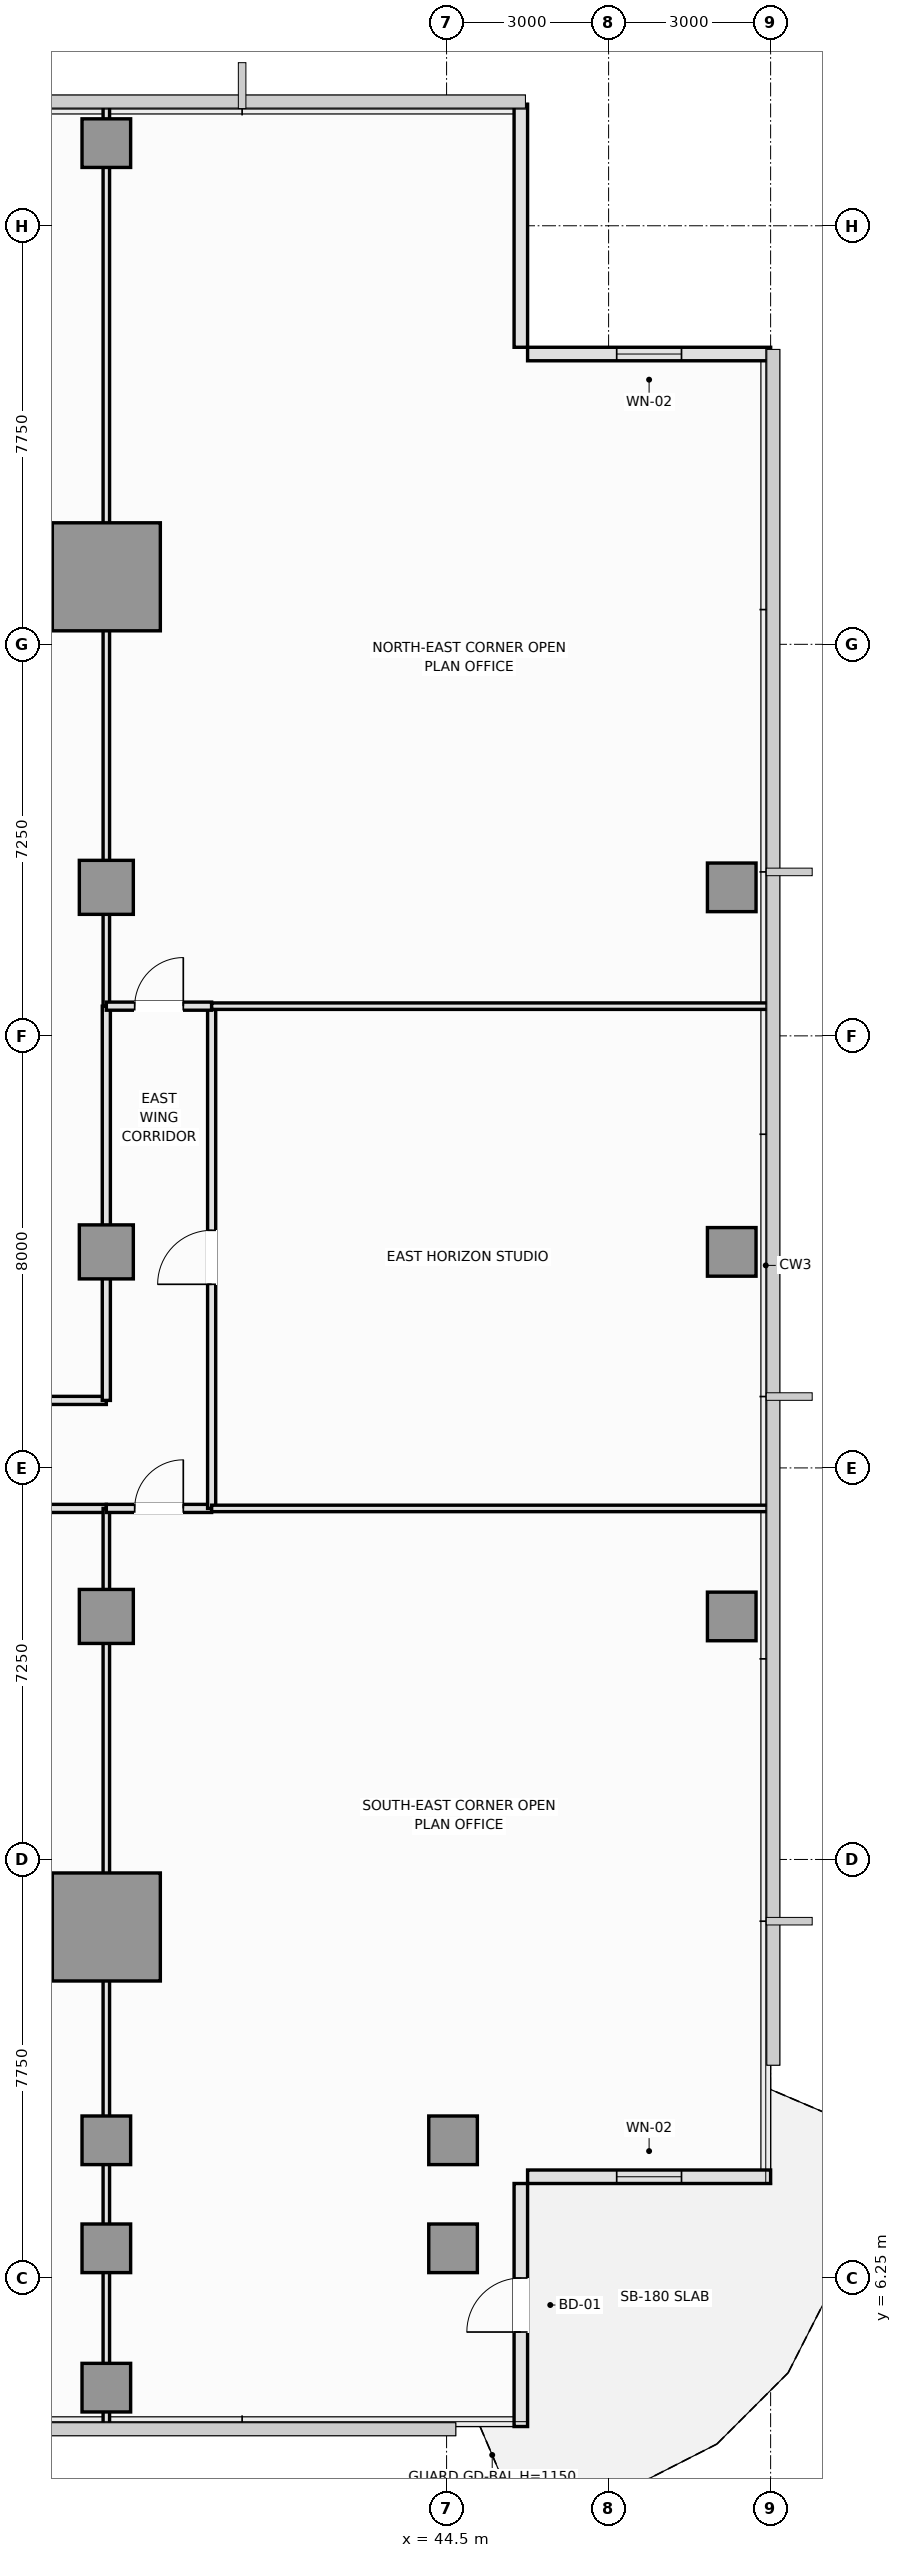
"""IFC4 building model, lengths in metres.
Left out: names, types, materials, properties, quantities, classifications, styles, units other than length and angle.
Written with IfcOpenShell. Run it as: python <this file> out.ifc"""

import sys

from ifc_helpers import new_model, si_unit, direction, frame, frame_2d, origin, origin_2d, place, context, subcontext, project, spatial, rectangle, extrude, element, fill, save


model = new_model("IFC4")
c1 = context("Model", 3, precision=1e-05, world=origin(), true_north=direction((0.0, 1.0)))
c2 = subcontext(c1, "Body", "Model", "MODEL_VIEW")
j1 = project(units=[si_unit("LENGTHUNIT", "METRE"), si_unit("PLANEANGLEUNIT", "RADIAN")], contexts=[c1])
p1 = place(None, origin())
s1 = spatial("IfcSite", under=j1, at=p1, CompositionType="ELEMENT")
p2 = place(p1, origin())
s2 = spatial("IfcBuilding", under=s1, at=p2, CompositionType="ELEMENT")
p3 = place(p2, frame((0.0, 0.0, 105.8)))
s3 = spatial("IfcBuildingStorey", under=s2, at=p3, CompositionType="ELEMENT", Elevation=105.8)
for number, where, z_axis, x_axis in (
    (1, (38.2, 12.75, 0.0), (0.0, 0.0, 1.0), (1.0, 0.0, 0.0)),
    (2, (38.2, 37.75, 0.0), (0.0, 0.0, 1.0), (1.0, 0.0, 0.0)),
):
    element("IfcColumn", number, at=place(p3, frame(where, z_axis=z_axis, x_axis=x_axis)), inside=s3, PredefinedType="COLUMN", context=c2, shape_type="SweptSolid", body=[
        extrude(rectangle(XDim=2.0, YDim=2.0, at=origin_2d()), origin(), (0.0, 0.0, 1.0), 3.55),
    ])
for number, where, z_axis, x_axis in (
    (3, (38.2, 18.5, 0.0), (0.0, 0.0, 1.0), (1.0, 0.0, 0.0)),
    (4, (38.2, 25.25, 0.0), (0.0, 0.0, 1.0), (1.0, 0.0, 0.0)),
    (5, (38.2, 32.0, 0.0), (0.0, 0.0, 1.0), (1.0, 0.0, 0.0)),
):
    element("IfcColumn", number, at=place(p3, frame(where, z_axis=z_axis, x_axis=x_axis)), inside=s3, PredefinedType="COLUMN", context=c2, shape_type="SweptSolid", body=[
        extrude(rectangle(XDim=1.0, YDim=1.0, at=origin_2d()), origin(), (0.0, 0.0, 1.0), 3.55),
    ])
for number, where, z_axis, x_axis in (
    (6, (38.2, 6.8, 0.0), (0.0, 0.0, 1.0), (1.0, 0.0, 0.0)),
    (7, (38.2, 8.8, 0.0), (0.0, 0.0, 1.0), (1.0, 0.0, 0.0)),
    (8, (44.62, 6.8, 0.0), (0.0, 0.0, 1.0), (1.0, 0.0, 0.0)),
    (9, (44.62, 8.8, 0.0), (0.0, 0.0, 1.0), (1.0, 0.0, 0.0)),
    (10, (49.78, 18.5, 0.0), (0.0, 0.0, 1.0), (1.0, 0.0, 0.0)),
    (11, (49.78, 25.25, 0.0), (0.0, 0.0, 1.0), (1.0, 0.0, 0.0)),
    (12, (49.78, 32.0, 0.0), (0.0, 0.0, 1.0), (1.0, 0.0, 0.0)),
    (13, (38.2, 4.22, 0.0), (0.0, 0.0, 1.0), (1.0, 0.0, 0.0)),
    (14, (38.2, 45.78, 0.0), (0.0, 0.0, 1.0), (1.0, 0.0, 0.0)),
):
    element("IfcColumn", number, at=place(p3, frame(where, z_axis=z_axis, x_axis=x_axis)), inside=s3, PredefinedType="COLUMN", context=c2, shape_type="SweptSolid", body=[
        extrude(rectangle(XDim=0.9, YDim=0.9, at=origin_2d()), origin(), (0.0, 0.0, 1.0), 3.55),
    ])
p4 = place(p3, frame((45.875, 3.5, 0.0), z_axis=(0.0, 0.0, 1.0), x_axis=(0.0, 1.0, 0.0)))
e15 = element("IfcWall", 15, at=p4, inside=s3, PredefinedType="SOLIDWALL", context=c2, shape_type="SweptSolid", body=[
    extrude(rectangle(XDim=4.5, YDim=0.25, at=frame_2d((2.25, 0.0))), origin(), (0.0, 0.0, 1.0), 3.07),
])
p5 = place(p4, frame((1.75, 0.0, 0.0)))
e16 = element("IfcOpeningElement", 16, at=p5, cuts=e15, PredefinedType="OPENING", context=c2, shape_type="SweptSolid", body=[
    extrude(rectangle(XDim=1.0, YDim=2.2, at=frame_2d((0.5, 1.1))), frame((0.0, 0.135, 0.0), z_axis=(0.0, -1.0, 0.0), x_axis=(1.0, 0.0, 0.0)), (0.0, 0.0, 1.0), 0.27),
])
p6 = place(p3, frame((46.0, 8.125, 0.0), z_axis=(0.0, 0.0, 1.0), x_axis=(1.0, 0.0, 0.0)))
e17 = element("IfcWall", 17, at=p6, inside=s3, PredefinedType="SOLIDWALL", context=c2, shape_type="SweptSolid", body=[
    extrude(rectangle(XDim=4.5, YDim=0.25, at=frame_2d((2.25, 0.0))), origin(), (0.0, 0.0, 1.0), 3.1),
])
p7 = place(p6, frame((1.65, 0.0, 0.9)))
e18 = element("IfcOpeningElement", 18, at=p7, cuts=e17, PredefinedType="OPENING", context=c2, shape_type="SweptSolid", body=[
    extrude(rectangle(XDim=1.2, YDim=1.8, at=frame_2d((0.6, 0.9))), frame((0.0, 0.135, 0.0), z_axis=(0.0, -1.0, 0.0), x_axis=(1.0, 0.0, 0.0)), (0.0, 0.0, 1.0), 0.27),
])
p8 = place(p3, frame((50.5, 41.875, 0.0), z_axis=(0.0, 0.0, 1.0), x_axis=(-1.0, 0.0, 0.0)))
e19 = element("IfcWall", 19, at=p8, inside=s3, PredefinedType="SOLIDWALL", context=c2, shape_type="SweptSolid", body=[
    extrude(rectangle(XDim=4.5, YDim=0.25, at=frame_2d((2.25, 0.0))), origin(), (0.0, 0.0, 1.0), 3.37),
])
p9 = place(p8, frame((1.65, 0.0, 0.9)))
e20 = element("IfcOpeningElement", 20, at=p9, cuts=e19, PredefinedType="OPENING", context=c2, shape_type="SweptSolid", body=[
    extrude(rectangle(XDim=1.2, YDim=1.8, at=frame_2d((0.6, 0.9))), frame((0.0, 0.135, 0.0), z_axis=(0.0, -1.0, 0.0), x_axis=(1.0, 0.0, 0.0)), (0.0, 0.0, 1.0), 0.27),
])
p10 = place(p3, frame((45.875, 42.0, 0.0), z_axis=(0.0, 0.0, 1.0), x_axis=(0.0, 1.0, 0.0)))
e21 = element("IfcWall", 21, at=p10, inside=s3, PredefinedType="SOLIDWALL", context=c2, shape_type="SweptSolid", body=[
    extrude(rectangle(XDim=4.5, YDim=0.25, at=frame_2d((2.25, 0.0))), origin(), (0.0, 0.0, 1.0), 3.37),
])
p11 = place(p3, frame((33.0, 20.5, 0.0), z_axis=(0.0, 0.0, 1.0), x_axis=(1.0, 0.0, 0.0)))
e22 = element("IfcWall", 22, at=p11, inside=s3, PredefinedType="PARTITIONING", context=c2, shape_type="SweptSolid", body=[
    extrude(rectangle(XDim=5.2, YDim=0.15, at=frame_2d((2.6, 0.0))), origin(), (0.0, 0.0, 1.0), 3.37),
])
p12 = place(p11, frame((2.1, 0.0, 0.0)))
e23 = element("IfcOpeningElement", 23, at=p12, cuts=e22, PredefinedType="OPENING", context=c2, shape_type="SweptSolid", body=[
    extrude(rectangle(XDim=1.0, YDim=2.15, at=frame_2d((0.5, 1.075))), frame((0.0, 0.085, 0.0), z_axis=(0.0, -1.0, 0.0), x_axis=(1.0, 0.0, 0.0)), (0.0, 0.0, 1.0), 0.17),
])
p13 = place(p3, frame((27.5, 22.5, 0.0), z_axis=(0.0, 0.0, 1.0), x_axis=(1.0, 0.0, 0.0)))
e24 = element("IfcWall", 24, at=p13, inside=s3, PredefinedType="PARTITIONING", context=c2, shape_type="SweptSolid", body=[
    extrude(rectangle(XDim=10.7, YDim=0.15, at=frame_2d((5.35, 0.0))), origin(), (0.0, 0.0, 1.0), 3.37),
])
p14 = place(p13, frame((4.85, 0.0, 0.0)))
e25 = element("IfcOpeningElement", 25, at=p14, cuts=e24, PredefinedType="OPENING", context=c2, shape_type="SweptSolid", body=[
    extrude(rectangle(XDim=1.0, YDim=2.15, at=frame_2d((0.5, 1.075))), frame((0.0, 0.085, 0.0), z_axis=(0.0, -1.0, 0.0), x_axis=(1.0, 0.0, 0.0)), (0.0, 0.0, 1.0), 0.17),
])
p15 = place(p3, frame((38.2, 3.51, 0.0), z_axis=(0.0, 0.0, 1.0), x_axis=(0.0, 1.0, 0.0)))
e26 = element("IfcWall", 26, at=p15, inside=s3, PredefinedType="PARTITIONING", context=c2, shape_type="SweptSolid", body=[
    extrude(rectangle(XDim=16.99, YDim=0.12, at=frame_2d((8.495, 0.0))), origin(), (0.0, 0.0, 1.0), 2.87),
])
p16 = place(p3, frame((38.2, 22.5, 0.0), z_axis=(0.0, 0.0, 1.0), x_axis=(0.0, 1.0, 0.0)))
e27 = element("IfcWall", 27, at=p16, inside=s3, PredefinedType="PARTITIONING", context=c2, shape_type="SweptSolid", body=[
    extrude(rectangle(XDim=7.3, YDim=0.15, at=frame_2d((3.65, 0.0))), origin(), (0.0, 0.0, 1.0), 2.87),
])
p17 = place(p3, frame((38.2, 29.8, 0.0), z_axis=(0.0, 0.0, 1.0), x_axis=(0.0, 1.0, 0.0)))
e28 = element("IfcWall", 28, at=p17, inside=s3, PredefinedType="PARTITIONING", context=c2, shape_type="SweptSolid", body=[
    extrude(rectangle(XDim=16.69, YDim=0.12, at=frame_2d((8.345, 0.0))), origin(), (0.0, 0.0, 1.0), 2.87),
])
p18 = place(p3, frame((38.2, 20.5, 0.0), z_axis=(0.0, 0.0, 1.0), x_axis=(1.0, 0.0, 0.0)))
e29 = element("IfcWall", 29, at=p18, inside=s3, PredefinedType="PARTITIONING", context=c2, shape_type="SweptSolid", body=[
    extrude(rectangle(XDim=1.95, YDim=0.15, at=frame_2d((0.975, 0.0))), origin(), (0.0, 0.0, 1.0), 3.37),
])
p19 = place(p18, frame((0.525, 0.0, 0.0)))
e30 = element("IfcOpeningElement", 30, at=p19, cuts=e29, PredefinedType="OPENING", context=c2, shape_type="SweptSolid", body=[
    extrude(rectangle(XDim=0.9, YDim=2.1, at=frame_2d((0.45, 1.05))), frame((0.0, 0.085, 0.0), z_axis=(0.0, -1.0, 0.0), x_axis=(1.0, 0.0, 0.0)), (0.0, 0.0, 1.0), 0.17),
])
p20 = place(p3, frame((40.15, 20.5, 0.0), z_axis=(0.0, 0.0, 1.0), x_axis=(0.0, 1.0, 0.0)))
e31 = element("IfcWall", 31, at=p20, inside=s3, PredefinedType="PARTITIONING", context=c2, shape_type="SweptSolid", body=[
    extrude(rectangle(XDim=9.3, YDim=0.15, at=frame_2d((4.65, 0.0))), origin(), (0.0, 0.0, 1.0), 3.37),
])
p21 = place(p20, frame((4.15, 0.0, 0.0)))
e32 = element("IfcOpeningElement", 32, at=p21, cuts=e31, PredefinedType="OPENING", context=c2, shape_type="SweptSolid", body=[
    extrude(rectangle(XDim=1.0, YDim=2.15, at=frame_2d((0.5, 1.075))), frame((0.0, 0.085, 0.0), z_axis=(0.0, -1.0, 0.0), x_axis=(1.0, 0.0, 0.0)), (0.0, 0.0, 1.0), 0.17),
])
p22 = place(p3, frame((38.2, 29.8, 0.0), z_axis=(0.0, 0.0, 1.0), x_axis=(1.0, 0.0, 0.0)))
e33 = element("IfcWall", 33, at=p22, inside=s3, PredefinedType="PARTITIONING", context=c2, shape_type="SweptSolid", body=[
    extrude(rectangle(XDim=1.95, YDim=0.15, at=frame_2d((0.975, 0.0))), origin(), (0.0, 0.0, 1.0), 3.37),
])
p23 = place(p22, frame((0.525, 0.0, 0.0)))
e34 = element("IfcOpeningElement", 34, at=p23, cuts=e33, PredefinedType="OPENING", context=c2, shape_type="SweptSolid", body=[
    extrude(rectangle(XDim=0.9, YDim=2.1, at=frame_2d((0.45, 1.05))), frame((0.0, 0.085, 0.0), z_axis=(0.0, -1.0, 0.0), x_axis=(1.0, 0.0, 0.0)), (0.0, 0.0, 1.0), 0.17),
])
for number, where, z_axis, x_axis in (
    (35, (40.15, 20.5, 0.0), (0.0, 0.0, 1.0), (1.0, 0.0, 0.0)),
    (36, (40.15, 29.8, 0.0), (0.0, 0.0, 1.0), (1.0, 0.0, 0.0)),
):
    element("IfcWall", number, at=place(p3, frame(where, z_axis=z_axis, x_axis=x_axis)), inside=s3, PredefinedType="PARTITIONING", context=c2, shape_type="SweptSolid", body=[
        extrude(rectangle(XDim=10.34, YDim=0.12, at=frame_2d((5.17, 0.0))), origin(), (0.0, 0.0, 1.0), 3.37),
    ])
p24 = place(p5, frame((1.0, 0.0, 0.0), z_axis=(0.0, 0.0, 1.0), x_axis=(-1.0, 0.0, 0.0)))
e37 = element("IfcDoor", 37, at=p24, inside=s3, OperationType="SINGLE_SWING_LEFT", PredefinedType="DOOR", context=c2, shape_type="SweptSolid", body=[
    extrude(rectangle(XDim=1.0, YDim=2.2, at=frame_2d((0.5, 1.1))), frame((0.0, 0.025, 0.0), z_axis=(0.0, -1.0, 0.0), x_axis=(1.0, 0.0, 0.0)), (0.0, 0.0, 1.0), 0.05),
])
fill(e16, e37)
p25 = place(p7, origin())
e38 = element("IfcWindow", 38, at=p25, inside=s3, PartitioningType="SINGLE_PANEL", PredefinedType="WINDOW", context=c2, shape_type="SweptSolid", body=[
    extrude(rectangle(XDim=1.2, YDim=1.8, at=frame_2d((0.6, 0.9))), frame((0.0, 0.03, 0.0), z_axis=(0.0, -1.0, 0.0), x_axis=(1.0, 0.0, 0.0)), (0.0, 0.0, 1.0), 0.06),
])
fill(e18, e38)
p26 = place(p9, origin())
e39 = element("IfcWindow", 39, at=p26, inside=s3, PartitioningType="SINGLE_PANEL", PredefinedType="WINDOW", context=c2, shape_type="SweptSolid", body=[
    extrude(rectangle(XDim=1.2, YDim=1.8, at=frame_2d((0.6, 0.9))), frame((0.0, 0.03, 0.0), z_axis=(0.0, -1.0, 0.0), x_axis=(1.0, 0.0, 0.0)), (0.0, 0.0, 1.0), 0.06),
])
fill(e20, e39)
p27 = place(p19, origin())
e40 = element("IfcDoor", 40, at=p27, inside=s3, OperationType="SINGLE_SWING_RIGHT", PredefinedType="DOOR", context=c2, shape_type="SweptSolid", body=[
    extrude(rectangle(XDim=0.9, YDim=2.1, at=frame_2d((0.45, 1.05))), frame((0.0, 0.025, 0.0), z_axis=(0.0, -1.0, 0.0), x_axis=(1.0, 0.0, 0.0)), (0.0, 0.0, 1.0), 0.05),
])
fill(e30, e40)
p28 = place(p21, origin())
e41 = element("IfcDoor", 41, at=p28, inside=s3, OperationType="SINGLE_SWING_LEFT", PredefinedType="DOOR", context=c2, shape_type="SweptSolid", body=[
    extrude(rectangle(XDim=1.0, YDim=2.15, at=frame_2d((0.5, 1.075))), frame((0.0, 0.025, 0.0), z_axis=(0.0, -1.0, 0.0), x_axis=(1.0, 0.0, 0.0)), (0.0, 0.0, 1.0), 0.05),
])
fill(e32, e41)
p29 = place(p23, origin())
e42 = element("IfcDoor", 42, at=p29, inside=s3, OperationType="SINGLE_SWING_RIGHT", PredefinedType="DOOR", context=c2, shape_type="SweptSolid", body=[
    extrude(rectangle(XDim=0.9, YDim=2.1, at=frame_2d((0.45, 1.05))), frame((0.0, 0.025, 0.0), z_axis=(0.0, -1.0, 0.0), x_axis=(1.0, 0.0, 0.0)), (0.0, 0.0, 1.0), 0.05),
])
fill(e34, e42)
save(model, sys.argv[1])
